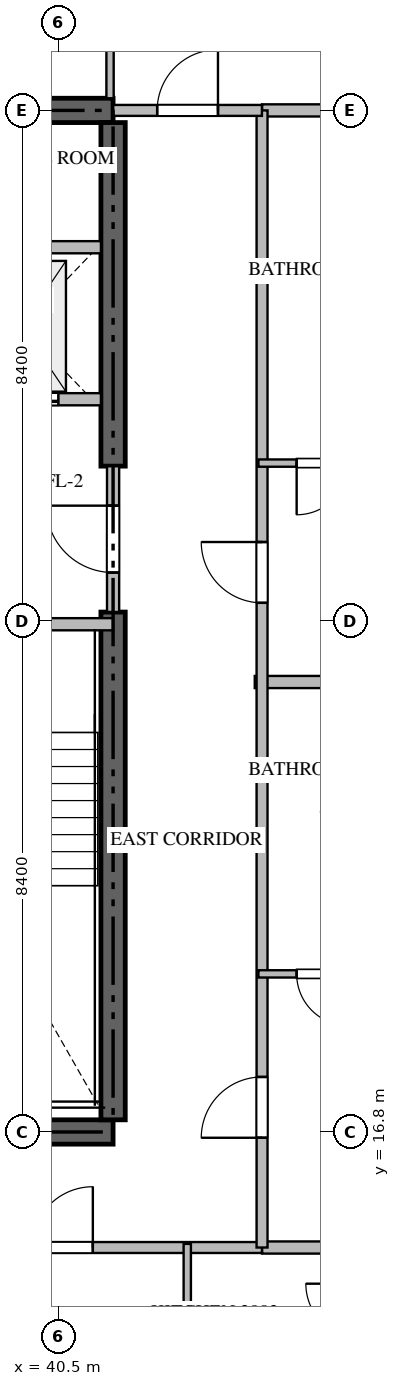
"""IFC4 building model, lengths in metres.
Left out: names, types, materials, properties, quantities, classifications, styles, units other than length and angle.
Written with IfcOpenShell. Run it as: python <this file> out.ifc"""

import sys

from ifc_helpers import new_model, si_unit, direction, frame, frame_2d, origin, place, context, subcontext, project, spatial, rectangle, extrude, source, transform, mapped, element, fill, save


model = new_model("IFC4")
c1 = context("Model", 3, precision=1e-05, world=origin(), true_north=direction((0.0, 1.0)))
c2 = subcontext(c1, "Body", "Model", "MODEL_VIEW")
j1 = project(units=[si_unit("LENGTHUNIT", "METRE"), si_unit("PLANEANGLEUNIT", "RADIAN")], contexts=[c1])
p1 = place(None, origin())
s1 = spatial("IfcSite", under=j1, at=p1, CompositionType="ELEMENT")
p2 = place(p1, origin())
s2 = spatial("IfcBuilding", under=s1, at=p2, CompositionType="ELEMENT")
p3 = place(p2, frame((0.0, 0.0, 123.9)))
s3 = spatial("IfcBuildingStorey", under=s2, at=p3, CompositionType="ELEMENT", Elevation=123.9)
for number, where, z_axis, x_axis in (
    (1, (23.4, 16.8, -0.26), (0.0, 0.0, 1.0), (1.0, 0.0, 0.0)),
    (2, (41.4, 33.6, -0.26), (0.0, 0.0, 1.0), (-1.0, 0.0, 0.0)),
):
    element("IfcWall", number, at=place(p3, frame(where, z_axis=z_axis, x_axis=x_axis)), inside=s3, PredefinedType="SHEAR", context=c2, shape_type="SweptSolid", body=[
        extrude(rectangle(XDim=18.0, YDim=0.4, at=frame_2d((9.0, 0.0))), origin(), (0.0, 0.0, 1.0), 3.748),
    ])
p4 = place(p3, frame((41.4, 17.0, -0.26), z_axis=(0.0, 0.0, 1.0), x_axis=(0.0, 1.0, 0.0)))
e3 = element("IfcWall", 3, at=p4, inside=s3, PredefinedType="SHEAR", context=c2, shape_type="SweptSolid", body=[
    extrude(rectangle(XDim=8.35, YDim=0.4, at=frame_2d((4.175, 0.0))), origin(), (0.0, 0.0, 1.0), 3.748),
])
p5 = place(p3, frame((41.4, 27.75, -0.26), z_axis=(0.0, 0.0, 1.0), x_axis=(0.0, 1.0, 0.0)))
e4 = element("IfcWall", 4, at=p5, inside=s3, PredefinedType="SHEAR", context=c2, shape_type="SweptSolid", body=[
    extrude(rectangle(XDim=5.65, YDim=0.4, at=frame_2d((2.825, 0.0))), origin(), (0.0, 0.0, 1.0), 3.748),
])
p6 = place(p3, frame((36.95, 25.15, 0.0), z_axis=(0.0, 0.0, 1.0), x_axis=(1.0, 0.0, 0.0)))
e5 = element("IfcWall", 5, at=p6, inside=s3, PredefinedType="STANDARD", context=c2, shape_type="SweptSolid", body=[
    extrude(rectangle(XDim=4.45, YDim=0.2, at=frame_2d((2.225, 0.0))), origin(), (0.0, 0.0, 1.0), 3.49),
])
p7 = place(p6, frame((1.65, 0.0, 0.0)))
e6 = element("IfcOpeningElement", 6, at=p7, cuts=e5, PredefinedType="OPENING", context=c2, shape_type="SweptSolid", body=[
    extrude(rectangle(XDim=1.1, YDim=2.15, at=frame_2d((0.55, 1.075))), frame((0.0, 0.11, 0.0), z_axis=(0.0, -1.0, 0.0), x_axis=(1.0, 0.0, 0.0)), (0.0, 0.0, 1.0), 0.22),
])
p8 = place(p3, frame((38.75, 28.85, 0.0), z_axis=(0.0, 0.0, 1.0), x_axis=(1.0, 0.0, 0.0)))
e7 = element("IfcWall", 7, at=p8, inside=s3, PredefinedType="STANDARD", context=c2, shape_type="SweptSolid", body=[
    extrude(rectangle(XDim=2.45, YDim=0.2, at=frame_2d((1.225, 0.0))), origin(), (0.0, 0.0, 1.0), 3.49),
])
p9 = place(p8, frame((0.55, 0.0, 0.0)))
e8 = element("IfcOpeningElement", 8, at=p9, cuts=e7, PredefinedType="OPENING", context=c2, shape_type="SweptSolid", body=[
    extrude(rectangle(XDim=1.2, YDim=2.2, at=frame_2d((0.6, 1.1))), frame((0.0, 0.11, 0.0), z_axis=(0.0, -1.0, 0.0), x_axis=(1.0, 0.0, 0.0)), (0.0, 0.0, 1.0), 0.22),
])
p10 = place(p3, frame((38.75, 31.35, 0.0), z_axis=(0.0, 0.0, 1.0), x_axis=(1.0, 0.0, 0.0)))
e9 = element("IfcWall", 9, at=p10, inside=s3, PredefinedType="STANDARD", context=c2, shape_type="SweptSolid", body=[
    extrude(rectangle(XDim=2.45, YDim=0.2, at=frame_2d((1.225, 0.0))), origin(), (0.0, 0.0, 1.0), 3.49),
])
p11 = place(p3, frame((41.4, 25.352, 0.0), z_axis=(0.0, 0.0, 1.0), x_axis=(0.0, 1.0, 0.0)))
e10 = element("IfcWall", 10, at=p11, inside=s3, PredefinedType="STANDARD", context=c2, shape_type="SweptSolid", body=[
    extrude(rectangle(XDim=2.396, YDim=0.2, at=frame_2d((1.198, 0.0))), origin(), (0.0, 0.0, 1.0), 3.49),
])
p12 = place(p11, frame((0.648, 0.0, 0.0)))
e11 = element("IfcOpeningElement", 11, at=p12, cuts=e10, PredefinedType="OPENING", context=c2, shape_type="SweptSolid", body=[
    extrude(rectangle(XDim=1.1, YDim=2.15, at=frame_2d((0.55, 1.075))), frame((0.0, 0.11, 0.0), z_axis=(0.0, -1.0, 0.0), x_axis=(1.0, 0.0, 0.0)), (0.0, 0.0, 1.0), 0.22),
])
p13 = place(p3, frame((43.73, 24.2, 0.0), z_axis=(0.0, 0.0, 1.0), x_axis=(1.0, 0.0, 0.0)))
e12 = element("IfcWall", 12, at=p13, inside=s3, PredefinedType="PARTITIONING", context=c2, shape_type="SweptSolid", body=[
    extrude(rectangle(XDim=13.188, YDim=0.2, at=frame_2d((6.594, 0.0))), origin(), (0.0, 0.0, 1.0), 3.49),
])
for number, where, z_axis, x_axis in (
    (13, (43.85, 14.9, 0.0), (0.0, 0.0, 1.0), (1.0, 0.0, 0.0)),
    (14, (43.85, 33.6, 0.0), (0.0, 0.0, 1.0), (1.0, 0.0, 0.0)),
):
    element("IfcWall", number, at=place(p3, frame(where, z_axis=z_axis, x_axis=x_axis)), inside=s3, PredefinedType="PARTITIONING", context=c2, shape_type="SweptSolid", body=[
        extrude(rectangle(XDim=13.068, YDim=0.2, at=frame_2d((6.534, 0.0))), origin(), (0.0, 0.0, 1.0), 3.49),
    ])
p14 = place(p3, frame((20.952, 14.9, 0.0), z_axis=(0.0, 0.0, 1.0), x_axis=(1.0, 0.0, 0.0)))
e15 = element("IfcWall", 15, at=p14, inside=s3, PredefinedType="PARTITIONING", context=c2, shape_type="SweptSolid", body=[
    extrude(rectangle(XDim=22.896, YDim=0.18, at=frame_2d((11.448, 0.0))), origin(), (0.0, 0.0, 1.0), 3.49),
])
p15 = place(p14, frame((2.781, 0.0, 0.0)))
e16 = element("IfcOpeningElement", 16, at=p15, cuts=e15, PredefinedType="OPENING", context=c2, shape_type="SweptSolid", body=[
    extrude(rectangle(XDim=1.0, YDim=2.15, at=frame_2d((0.5, 1.075))), frame((0.0, 0.1, 0.0), z_axis=(0.0, -1.0, 0.0), x_axis=(1.0, 0.0, 0.0)), (0.0, 0.0, 1.0), 0.2),
])
p16 = place(p14, frame((7.16, 0.0, 0.0)))
e17 = element("IfcOpeningElement", 17, at=p16, cuts=e15, PredefinedType="OPENING", context=c2, shape_type="SweptSolid", body=[
    extrude(rectangle(XDim=1.0, YDim=2.15, at=frame_2d((0.5, 1.075))), frame((0.0, 0.1, 0.0), z_axis=(0.0, -1.0, 0.0), x_axis=(1.0, 0.0, 0.0)), (0.0, 0.0, 1.0), 0.2),
])
p17 = place(p14, frame((19.115, 0.0, 0.0)))
e18 = element("IfcOpeningElement", 18, at=p17, cuts=e15, PredefinedType="OPENING", context=c2, shape_type="SweptSolid", body=[
    extrude(rectangle(XDim=1.0, YDim=2.15, at=frame_2d((0.5, 1.075))), frame((0.0, 0.1, 0.0), z_axis=(0.0, -1.0, 0.0), x_axis=(1.0, 0.0, 0.0)), (0.0, 0.0, 1.0), 0.2),
])
p18 = place(p3, frame((43.85, 14.9, 0.0), z_axis=(0.0, 0.0, 1.0), x_axis=(0.0, 1.0, 0.0)))
e19 = element("IfcWall", 19, at=p18, inside=s3, PredefinedType="PARTITIONING", context=c2, shape_type="SweptSolid", body=[
    extrude(rectangle(XDim=18.7, YDim=0.18, at=frame_2d((9.35, 0.0))), origin(), (0.0, 0.0, 1.0), 3.49),
])
p19 = place(p18, frame((1.805, 0.0, 0.0)))
e20 = element("IfcOpeningElement", 20, at=p19, cuts=e19, PredefinedType="OPENING", context=c2, shape_type="SweptSolid", body=[
    extrude(rectangle(XDim=1.0, YDim=2.15, at=frame_2d((0.5, 1.075))), frame((0.0, 0.1, 0.0), z_axis=(0.0, -1.0, 0.0), x_axis=(1.0, 0.0, 0.0)), (0.0, 0.0, 1.0), 0.2),
])
p20 = place(p18, frame((10.602, 0.0, 0.0)))
e21 = element("IfcOpeningElement", 21, at=p20, cuts=e19, PredefinedType="OPENING", context=c2, shape_type="SweptSolid", body=[
    extrude(rectangle(XDim=1.0, YDim=2.15, at=frame_2d((0.5, 1.075))), frame((0.0, 0.1, 0.0), z_axis=(0.0, -1.0, 0.0), x_axis=(1.0, 0.0, 0.0)), (0.0, 0.0, 1.0), 0.2),
])
p21 = place(p3, frame((41.402, 33.6, 0.0), z_axis=(0.0, 0.0, 1.0), x_axis=(1.0, 0.0, 0.0)))
e22 = element("IfcWall", 22, at=p21, inside=s3, PredefinedType="PARTITIONING", context=c2, shape_type="SweptSolid", body=[
    extrude(rectangle(XDim=2.446, YDim=0.18, at=frame_2d((1.223, 0.0))), origin(), (0.0, 0.0, 1.0), 3.49),
])
p22 = place(p21, frame((0.723, 0.0, 0.0)))
e23 = element("IfcOpeningElement", 23, at=p22, cuts=e22, PredefinedType="OPENING", context=c2, shape_type="SweptSolid", body=[
    extrude(rectangle(XDim=1.0, YDim=2.15, at=frame_2d((0.5, 1.075))), frame((0.0, 0.1, 0.0), z_axis=(0.0, -1.0, 0.0), x_axis=(1.0, 0.0, 0.0)), (0.0, 0.0, 1.0), 0.2),
])
p23 = place(p3, frame((42.62, 12.15, 0.0), z_axis=(0.0, 0.0, 1.0), x_axis=(0.0, 1.0, 0.0)))
e24 = element("IfcWall", 24, at=p23, inside=s3, PredefinedType="PARTITIONING", context=c2, shape_type="SweptSolid", body=[
    extrude(rectangle(XDim=2.81, YDim=0.12, at=frame_2d((1.405, 0.0))), origin(), (0.0, 0.0, 1.0), 3.49),
])
p24 = place(p3, frame((41.35, 36.35, 0.0), z_axis=(0.0, 0.0, 1.0), x_axis=(0.0, -1.0, 0.0)))
e25 = element("IfcWall", 25, at=p24, inside=s3, PredefinedType="PARTITIONING", context=c2, shape_type="SweptSolid", body=[
    extrude(rectangle(XDim=2.55, YDim=0.12, at=frame_2d((1.275, 0.0))), origin(), (0.0, 0.0, 1.0), 3.49),
])
p25 = place(p3, frame((45.898, 19.4, 0.0), z_axis=(0.0, 0.0, 1.0), x_axis=(-1.0, 0.0, 0.0)))
e26 = element("IfcWall", 26, at=p25, inside=s3, PredefinedType="PARTITIONING", context=c2, shape_type="SweptSolid", body=[
    extrude(rectangle(XDim=2.108, YDim=0.12, at=frame_2d((1.054, 0.0))), origin(), (0.0, 0.0, 1.0), 3.49),
])
p26 = place(p25, frame((0.629, 0.0, 0.0)))
e27 = element("IfcOpeningElement", 27, at=p26, cuts=e26, PredefinedType="OPENING", context=c2, shape_type="SweptSolid", body=[
    extrude(rectangle(XDim=0.85, YDim=2.1, at=frame_2d((0.425, 1.05))), frame((0.0, 0.07, 0.0), z_axis=(0.0, -1.0, 0.0), x_axis=(1.0, 0.0, 0.0)), (0.0, 0.0, 1.0), 0.14),
])
p27 = place(p3, frame((45.898, 27.8, 0.0), z_axis=(0.0, 0.0, 1.0), x_axis=(-1.0, 0.0, 0.0)))
e28 = element("IfcWall", 28, at=p27, inside=s3, PredefinedType="PARTITIONING", context=c2, shape_type="SweptSolid", body=[
    extrude(rectangle(XDim=2.108, YDim=0.12, at=frame_2d((1.054, 0.0))), origin(), (0.0, 0.0, 1.0), 3.49),
])
p28 = place(p27, frame((0.629, 0.0, 0.0)))
e29 = element("IfcOpeningElement", 29, at=p28, cuts=e28, PredefinedType="OPENING", context=c2, shape_type="SweptSolid", body=[
    extrude(rectangle(XDim=0.85, YDim=2.1, at=frame_2d((0.425, 1.05))), frame((0.0, 0.07, 0.0), z_axis=(0.0, -1.0, 0.0), x_axis=(1.0, 0.0, 0.0)), (0.0, 0.0, 1.0), 0.14),
])
m1 = source(origin(), c2, "Body", "SweptSolid", [
    extrude(rectangle(XDim=1.2, YDim=2.2, at=frame_2d((0.6, 1.1))), frame((0.0, 0.025, 0.0), z_axis=(0.0, -1.0, 0.0), x_axis=(1.0, 0.0, 0.0)), (0.0, 0.0, 1.0), 0.05),
])
p29 = place(p9, origin())
e30 = element("IfcDoor", 30, at=p29, inside=s3, OperationType="DOUBLE_DOOR_SLIDING", PredefinedType="DOOR", context=c2, shape_type="MappedRepresentation", body=[
    mapped(m1, transform((0.0, 0.0, 0.0), scale=1.0)),
])
fill(e8, e30)
m2 = source(origin(), c2, "Body", "SweptSolid", [
    extrude(rectangle(XDim=1.1, YDim=2.15, at=frame_2d((0.55, 1.075))), frame((0.0, 0.025, 0.0), z_axis=(0.0, -1.0, 0.0), x_axis=(1.0, 0.0, 0.0)), (0.0, 0.0, 1.0), 0.05),
])
p30 = place(p12, origin())
e31 = element("IfcDoor", 31, at=p30, inside=s3, OperationType="SINGLE_SWING_RIGHT", PredefinedType="DOOR", context=c2, shape_type="MappedRepresentation", body=[
    mapped(m2, transform((0.0, 0.0, 0.0), scale=1.0)),
])
fill(e11, e31)
m3 = source(origin(), c2, "Body", "SweptSolid", [
    extrude(rectangle(XDim=1.0, YDim=2.15, at=frame_2d((0.5, 1.075))), frame((0.0, 0.025, 0.0), z_axis=(0.0, -1.0, 0.0), x_axis=(1.0, 0.0, 0.0)), (0.0, 0.0, 1.0), 0.05),
])
p31 = place(p17, origin())
e32 = element("IfcDoor", 32, at=p31, inside=s3, OperationType="SINGLE_SWING_RIGHT", PredefinedType="DOOR", context=c2, shape_type="MappedRepresentation", body=[
    mapped(m3, transform((0.0, 0.0, 0.0), scale=1.0)),
])
fill(e18, e32)
p32 = place(p19, origin())
e33 = element("IfcDoor", 33, at=p32, inside=s3, OperationType="SINGLE_SWING_LEFT", PredefinedType="DOOR", context=c2, shape_type="MappedRepresentation", body=[
    mapped(m3, transform((0.0, 0.0, 0.0), scale=1.0)),
])
fill(e20, e33)
p33 = place(p20, origin())
e34 = element("IfcDoor", 34, at=p33, inside=s3, OperationType="SINGLE_SWING_RIGHT", PredefinedType="DOOR", context=c2, shape_type="MappedRepresentation", body=[
    mapped(m3, transform((0.0, 0.0, 0.0), scale=1.0)),
])
fill(e21, e34)
p34 = place(p22, origin())
e35 = element("IfcDoor", 35, at=p34, inside=s3, OperationType="SINGLE_SWING_RIGHT", PredefinedType="DOOR", context=c2, shape_type="MappedRepresentation", body=[
    mapped(m3, transform((0.0, 0.0, 0.0), scale=1.0)),
])
fill(e23, e35)
m4 = source(origin(), c2, "Body", "SweptSolid", [
    extrude(rectangle(XDim=0.85, YDim=2.1, at=frame_2d((0.425, 1.05))), frame((0.0, 0.025, 0.0), z_axis=(0.0, -1.0, 0.0), x_axis=(1.0, 0.0, 0.0)), (0.0, 0.0, 1.0), 0.05),
])
p35 = place(p26, origin())
e36 = element("IfcDoor", 36, at=p35, inside=s3, OperationType="SINGLE_SWING_LEFT", PredefinedType="DOOR", context=c2, shape_type="MappedRepresentation", body=[
    mapped(m4, transform((0.0, 0.0, 0.0), scale=1.0)),
])
fill(e27, e36)
p36 = place(p28, origin())
e37 = element("IfcDoor", 37, at=p36, inside=s3, OperationType="SINGLE_SWING_RIGHT", PredefinedType="DOOR", context=c2, shape_type="MappedRepresentation", body=[
    mapped(m4, transform((0.0, 0.0, 0.0), scale=1.0)),
])
fill(e29, e37)
save(model, sys.argv[1])
